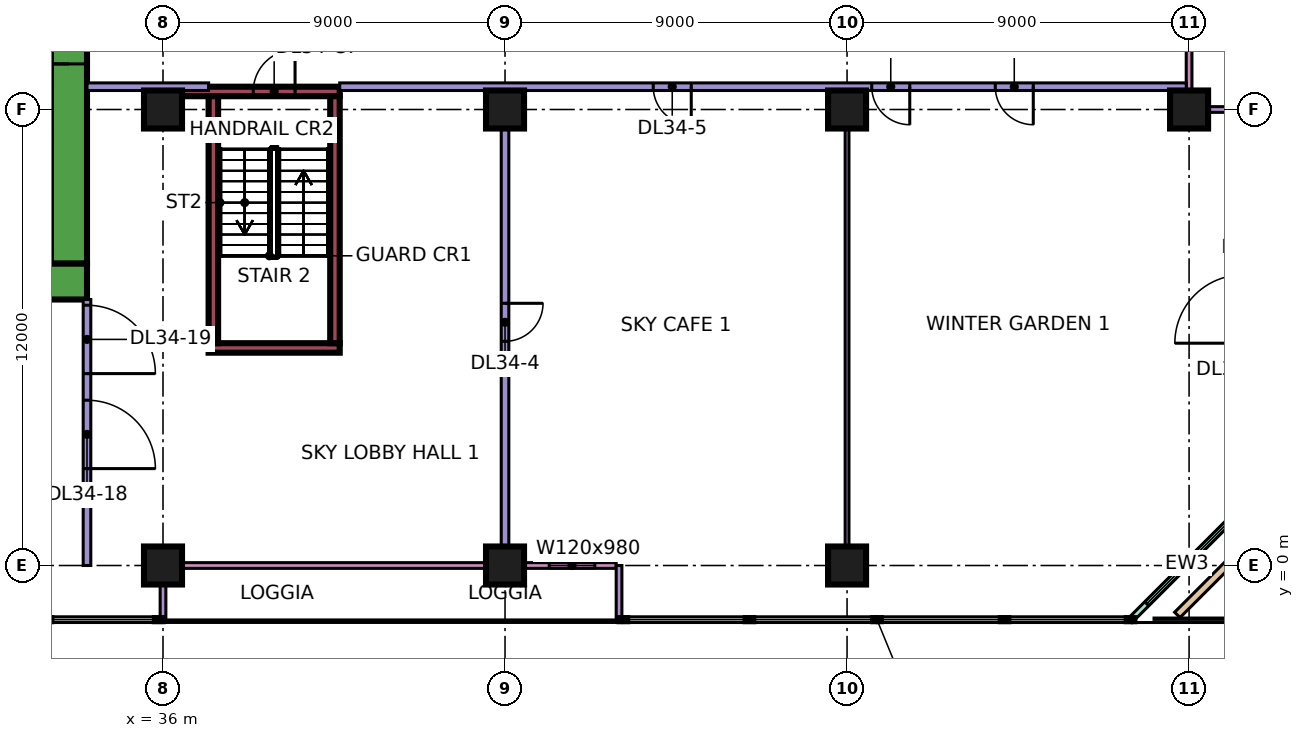
"""IFC4 building model, lengths in metres.
Left out: names, types, materials, properties, quantities, classifications, styles, units other than length and angle.
Written with IfcOpenShell. Run it as: python <this file> out.ifc"""

import sys

from ifc_helpers import new_model, si_unit, direction, frame, frame_2d, origin, origin_2d, place, context, subcontext, project, spatial, rectangle, extrude, element, fill, save


model = new_model("IFC4")
c1 = context("Model", 3, precision=1e-05, world=origin(), true_north=direction((0.0, 1.0)))
c2 = subcontext(c1, "Body", "Model", "MODEL_VIEW")
j1 = project(units=[si_unit("LENGTHUNIT", "METRE"), si_unit("PLANEANGLEUNIT", "RADIAN")], contexts=[c1])
p1 = place(None, origin())
s1 = spatial("IfcSite", under=j1, at=p1, CompositionType="ELEMENT")
p2 = place(p1, origin())
s2 = spatial("IfcBuilding", under=s1, at=p2, CompositionType="ELEMENT")
p3 = place(p2, frame((0.0, 0.0, 146.15)))
s3 = spatial("IfcBuildingStorey", under=s2, at=p3, CompositionType="ELEMENT", Elevation=146.15)
for number, where, z_axis, x_axis in (
    (1, (36.0, 0.0, 0.0), (0.0, 0.0, 1.0), (1.0, 0.0, 0.0)),
    (2, (36.0, 12.0, 0.0), (0.0, 0.0, 1.0), (1.0, 0.0, 0.0)),
    (3, (45.0, 0.0, 0.0), (0.0, 0.0, 1.0), (1.0, 0.0, 0.0)),
    (4, (45.0, 12.0, 0.0), (0.0, 0.0, 1.0), (1.0, 0.0, 0.0)),
    (5, (54.0, 0.0, 0.0), (0.0, 0.0, 1.0), (1.0, 0.0, 0.0)),
    (6, (54.0, 12.0, 0.0), (0.0, 0.0, 1.0), (1.0, 0.0, 0.0)),
    (7, (63.0, 12.0, 0.0), (0.0, 0.0, 1.0), (1.0, 0.0, 0.0)),
):
    element("IfcColumn", number, at=place(p3, frame(where, z_axis=z_axis, x_axis=x_axis)), inside=s3, PredefinedType="COLUMN", context=c2, shape_type="SweptSolid", body=[
        extrude(rectangle(XDim=1.0, YDim=1.0, at=origin_2d()), origin(), (0.0, 0.0, 1.0), 11.25),
    ])
p4 = place(p3, frame((9.0, 7.475, 0.0), z_axis=(0.0, 0.0, 1.0), x_axis=(1.0, 0.0, 0.0)))
e8 = element("IfcWall", 8, at=p4, inside=s3, PredefinedType="SHEAR", context=c2, shape_type="SweptSolid", body=[
    extrude(rectangle(XDim=25.0, YDim=0.95, at=frame_2d((12.5, 0.0))), origin(), (0.0, 0.0, 1.0), 11.25),
])
p5 = place(p3, frame((33.525, 7.95, 0.0), z_axis=(0.0, 0.0, 1.0), x_axis=(0.0, 1.0, 0.0)))
e9 = element("IfcWall", 9, at=p5, inside=s3, PredefinedType="SHEAR", context=c2, shape_type="SweptSolid", body=[
    extrude(rectangle(XDim=11.1, YDim=0.95, at=frame_2d((5.55, 0.0))), origin(), (0.0, 0.0, 1.0), 11.25),
])
p6 = place(p5, frame((5.25, 0.0, 0.0)))
e10 = element("IfcOpeningElement", 10, at=p6, cuts=e9, PredefinedType="OPENING", context=c2, shape_type="SweptSolid", body=[
    extrude(rectangle(XDim=1.8, YDim=2.4, at=frame_2d((0.9, 1.2))), frame((0.0, 0.485, 0.0), z_axis=(0.0, -1.0, 0.0), x_axis=(1.0, 0.0, 0.0)), (0.0, 0.0, 1.0), 0.97),
])
p7 = place(p3, frame((37.2, 5.725, 0.0), z_axis=(0.0, 0.0, 1.0), x_axis=(1.0, 0.0, 0.0)))
e11 = element("IfcWall", 11, at=p7, inside=s3, PredefinedType="SHEAR", context=c2, shape_type="SweptSolid", body=[
    extrude(rectangle(XDim=3.45, YDim=0.25, at=frame_2d((1.725, 0.0))), origin(), (0.0, 0.0, 1.0), 11.25),
])
p8 = place(p3, frame((36.5, 12.475, 0.0), z_axis=(0.0, 0.0, 1.0), x_axis=(1.0, 0.0, 0.0)))
e12 = element("IfcWall", 12, at=p8, inside=s3, PredefinedType="SHEAR", context=c2, shape_type="SweptSolid", body=[
    extrude(rectangle(XDim=4.15, YDim=0.25, at=frame_2d((2.075, 0.0))), origin(), (0.0, 0.0, 1.0), 11.25),
])
p9 = place(p8, frame((1.875, 0.0, 0.0)))
e13 = element("IfcOpeningElement", 13, at=p9, cuts=e12, PredefinedType="OPENING", context=c2, shape_type="SweptSolid", body=[
    extrude(rectangle(XDim=1.1, YDim=2.2, at=frame_2d((0.55, 1.1))), frame((0.0, 0.135, 0.0), z_axis=(0.0, -1.0, 0.0), x_axis=(1.0, 0.0, 0.0)), (0.0, 0.0, 1.0), 0.27),
])
for number, where, z_axis, x_axis in (
    (14, (37.325, 5.85, 0.0), (0.0, 0.0, 1.0), (0.0, 1.0, 0.0)),
    (15, (40.525, 5.85, 0.0), (0.0, 0.0, 1.0), (0.0, 1.0, 0.0)),
):
    element("IfcWall", number, at=place(p3, frame(where, z_axis=z_axis, x_axis=x_axis)), inside=s3, PredefinedType="SHEAR", context=c2, shape_type="SweptSolid", body=[
        extrude(rectangle(XDim=6.5, YDim=0.25, at=frame_2d((3.25, 0.0))), origin(), (0.0, 0.0, 1.0), 11.25),
    ])
p10 = place(p3, frame((36.075, 0.0, 0.0), z_axis=(0.0, 0.0, 1.0), x_axis=(1.0, 0.0, 0.0)))
e16 = element("IfcWall", 16, at=p10, inside=s3, PredefinedType="SOLIDWALL", context=c2, shape_type="SweptSolid", body=[
    extrude(rectangle(XDim=11.85, YDim=0.15, at=frame_2d((5.925, 0.0))), origin(), (0.0, 0.0, 1.0), 10.85),
])
p11 = place(p10, frame((10.087, 0.0, 0.45)))
e17 = element("IfcOpeningElement", 17, at=p11, cuts=e16, PredefinedType="OPENING", context=c2, shape_type="SweptSolid", body=[
    extrude(rectangle(XDim=1.2, YDim=9.8, at=frame_2d((0.6, 4.9))), frame((0.0, 0.085, 0.0), z_axis=(0.0, -1.0, 0.0), x_axis=(1.0, 0.0, 0.0)), (0.0, 0.0, 1.0), 0.17),
])
for number, where, z_axis, x_axis in (
    (18, (36.0, -1.5, 0.0), (0.0, 0.0, 1.0), (0.0, 1.0, 0.0)),
    (19, (48.0, -1.5, 0.0), (0.0, 0.0, 1.0), (0.0, 1.0, 0.0)),
):
    element("IfcWall", number, at=place(p3, frame(where, z_axis=z_axis, x_axis=x_axis)), inside=s3, PredefinedType="SOLIDWALL", context=c2, shape_type="SweptSolid", body=[
        extrude(rectangle(XDim=1.5, YDim=0.15, at=frame_2d((0.75, 0.0))), origin(), (0.0, 0.0, 1.0), 10.85),
    ])
p12 = place(p3, frame((61.447, -1.447, 0.0), z_axis=(0.0, 0.0, 1.0), x_axis=(0.707106781187, 0.707106781187, 0.0)))
e20 = element("IfcWall", 20, at=p12, inside=s3, PredefinedType="SOLIDWALL", context=c2, shape_type="SweptSolid", body=[
    extrude(rectangle(XDim=4.243, YDim=0.15, at=frame_2d((2.121, 0.0))), origin(), (0.0, 0.0, 1.0), 10.85),
])
p13 = place(p12, frame((0.621, 0.0, 0.45)))
e21 = element("IfcOpeningElement", 21, at=p13, cuts=e20, PredefinedType="OPENING", context=c2, shape_type="SweptSolid", body=[
    extrude(rectangle(XDim=3.0, YDim=9.8, at=frame_2d((1.5, 4.9))), frame((0.0, 0.085, 0.0), z_axis=(0.0, -1.0, 0.0), x_axis=(1.0, 0.0, 0.0)), (0.0, 0.0, 1.0), 0.17),
])
p14 = place(p3, frame((63.0, 12.075, 0.0), z_axis=(0.0, 0.0, 1.0), x_axis=(0.0, 1.0, 0.0)))
e22 = element("IfcWall", 22, at=p14, inside=s3, PredefinedType="SOLIDWALL", context=c2, shape_type="SweptSolid", body=[
    extrude(rectangle(XDim=10.35, YDim=0.15, at=frame_2d((5.175, 0.0))), origin(), (0.0, 0.0, 1.0), 10.85),
])
p15 = place(p14, frame((5.438, 0.0, 0.45)))
e23 = element("IfcOpeningElement", 23, at=p15, cuts=e22, PredefinedType="OPENING", context=c2, shape_type="SweptSolid", body=[
    extrude(rectangle(XDim=3.0, YDim=9.8, at=frame_2d((1.5, 4.9))), frame((0.0, 0.085, 0.0), z_axis=(0.0, -1.0, 0.0), x_axis=(1.0, 0.0, 0.0)), (0.0, 0.0, 1.0), 0.17),
])
p16 = place(p3, frame((64.5, 12.0, 0.0), z_axis=(0.0, 0.0, 1.0), x_axis=(-1.0, 0.0, 0.0)))
e24 = element("IfcWall", 24, at=p16, inside=s3, PredefinedType="SOLIDWALL", context=c2, shape_type="SweptSolid", body=[
    extrude(rectangle(XDim=1.5, YDim=0.15, at=frame_2d((0.75, 0.0))), origin(), (0.0, 0.0, 1.0), 10.85),
])
p17 = place(p3, frame((65.2, 1.21, 0.0), z_axis=(0.0, 0.0, 1.0), x_axis=(-0.707106781187, -0.707106781187, 0.0)))
e25 = element("IfcWall", 25, at=p17, inside=s3, PredefinedType="PARAPET", context=c2, shape_type="SweptSolid", body=[
    extrude(rectangle(XDim=3.55, YDim=0.2, at=frame_2d((1.775, 0.0))), origin(), (0.0, 0.0, 1.0), 0.5),
])
p18 = place(p3, frame((34.0, 0.0, 0.0), z_axis=(0.0, 0.0, 1.0), x_axis=(0.0, 1.0, 0.0)))
e26 = element("IfcWall", 26, at=p18, inside=s3, PredefinedType="PARTITIONING", context=c2, shape_type="SweptSolid", body=[
    extrude(rectangle(XDim=7.0, YDim=0.2, at=frame_2d((3.5, 0.0))), origin(), (0.0, 0.0, 1.0), 10.85),
])
p19 = place(p18, frame((2.55, 0.0, 0.0)))
e27 = element("IfcOpeningElement", 27, at=p19, cuts=e26, PredefinedType="OPENING", context=c2, shape_type="SweptSolid", body=[
    extrude(rectangle(XDim=1.8, YDim=2.1, at=frame_2d((0.9, 1.05))), frame((0.0, 0.11, 0.0), z_axis=(0.0, -1.0, 0.0), x_axis=(1.0, 0.0, 0.0)), (0.0, 0.0, 1.0), 0.22),
])
p20 = place(p18, frame((5.05, 0.0, 0.0)))
e28 = element("IfcOpeningElement", 28, at=p20, cuts=e26, PredefinedType="OPENING", context=c2, shape_type="SweptSolid", body=[
    extrude(rectangle(XDim=1.8, YDim=2.1, at=frame_2d((0.9, 1.05))), frame((0.0, 0.11, 0.0), z_axis=(0.0, -1.0, 0.0), x_axis=(1.0, 0.0, 0.0)), (0.0, 0.0, 1.0), 0.22),
])
p21 = place(p3, frame((34.0, 12.6, 0.0), z_axis=(0.0, 0.0, 1.0), x_axis=(1.0, 0.0, 0.0)))
e29 = element("IfcWall", 29, at=p21, inside=s3, PredefinedType="PARTITIONING", context=c2, shape_type="SweptSolid", body=[
    extrude(rectangle(XDim=3.2, YDim=0.2, at=frame_2d((1.6, 0.0))), origin(), (0.0, 0.0, 1.0), 10.85),
])
p22 = place(p3, frame((40.65, 12.6, 0.0), z_axis=(0.0, 0.0, 1.0), x_axis=(1.0, 0.0, 0.0)))
e30 = element("IfcWall", 30, at=p22, inside=s3, PredefinedType="PARTITIONING", context=c2, shape_type="SweptSolid", body=[
    extrude(rectangle(XDim=22.276, YDim=0.2, at=frame_2d((11.138, 0.0))), origin(), (0.0, 0.0, 1.0), 10.85),
])
p23 = place(p22, frame((8.25, 0.0, 0.0)))
e31 = element("IfcOpeningElement", 31, at=p23, cuts=e30, PredefinedType="OPENING", context=c2, shape_type="SweptSolid", body=[
    extrude(rectangle(XDim=1.0, YDim=2.1, at=frame_2d((0.5, 1.05))), frame((0.0, 0.11, 0.0), z_axis=(0.0, -1.0, 0.0), x_axis=(1.0, 0.0, 0.0)), (0.0, 0.0, 1.0), 0.22),
])
p24 = place(p22, frame((17.25, 0.0, 0.0)))
e32 = element("IfcOpeningElement", 32, at=p24, cuts=e30, PredefinedType="OPENING", context=c2, shape_type="SweptSolid", body=[
    extrude(rectangle(XDim=1.0, YDim=2.1, at=frame_2d((0.5, 1.05))), frame((0.0, 0.11, 0.0), z_axis=(0.0, -1.0, 0.0), x_axis=(1.0, 0.0, 0.0)), (0.0, 0.0, 1.0), 0.22),
])
p25 = place(p22, frame((14.0, 0.0, 0.0)))
e33 = element("IfcOpeningElement", 33, at=p25, cuts=e30, PredefinedType="OPENING", context=c2, shape_type="SweptSolid", body=[
    extrude(rectangle(XDim=1.0, YDim=2.1, at=frame_2d((0.5, 1.05))), frame((0.0, 0.11, 0.0), z_axis=(0.0, -1.0, 0.0), x_axis=(1.0, 0.0, 0.0)), (0.0, 0.0, 1.0), 0.22),
])
p26 = place(p3, frame((45.0, 0.074, 0.0), z_axis=(0.0, 0.0, 1.0), x_axis=(0.0, 1.0, 0.0)))
e34 = element("IfcWall", 34, at=p26, inside=s3, PredefinedType="PARTITIONING", context=c2, shape_type="SweptSolid", body=[
    extrude(rectangle(XDim=12.426, YDim=0.2, at=frame_2d((6.213, 0.0))), origin(), (0.0, 0.0, 1.0), 10.85),
])
p27 = place(p26, frame((5.826, 0.0, 0.0)))
e35 = element("IfcOpeningElement", 35, at=p27, cuts=e34, PredefinedType="OPENING", context=c2, shape_type="SweptSolid", body=[
    extrude(rectangle(XDim=1.0, YDim=2.1, at=frame_2d((0.5, 1.05))), frame((0.0, 0.11, 0.0), z_axis=(0.0, -1.0, 0.0), x_axis=(1.0, 0.0, 0.0)), (0.0, 0.0, 1.0), 0.22),
])
p28 = place(p3, frame((54.0, 0.0, 0.0), z_axis=(0.0, 0.0, 1.0), x_axis=(0.0, 1.0, 0.0)))
e36 = element("IfcWall", 36, at=p28, inside=s3, PredefinedType="PARTITIONING", context=c2, shape_type="SweptSolid", body=[
    extrude(rectangle(XDim=12.5, YDim=0.1, at=frame_2d((6.25, 0.0))), origin(), (0.0, 0.0, 1.0), 10.85),
])
p29 = place(p11, origin())
e37 = element("IfcWindow", 37, at=p29, inside=s3, PartitioningType="SINGLE_PANEL", PredefinedType="WINDOW", context=c2, shape_type="SweptSolid", body=[
    extrude(rectangle(XDim=1.2, YDim=9.8, at=frame_2d((0.6, 4.9))), frame((0.0, 0.03, 0.0), z_axis=(0.0, -1.0, 0.0), x_axis=(1.0, 0.0, 0.0)), (0.0, 0.0, 1.0), 0.06),
])
fill(e17, e37)
p30 = place(p13, origin())
e38 = element("IfcWindow", 38, at=p30, inside=s3, PartitioningType="SINGLE_PANEL", PredefinedType="WINDOW", context=c2, shape_type="SweptSolid", body=[
    extrude(rectangle(XDim=3.0, YDim=9.8, at=frame_2d((1.5, 4.9))), frame((0.0, 0.03, 0.0), z_axis=(0.0, -1.0, 0.0), x_axis=(1.0, 0.0, 0.0)), (0.0, 0.0, 1.0), 0.06),
])
fill(e21, e38)
p31 = place(p6, origin())
e39 = element("IfcDoor", 39, at=p31, inside=s3, OperationType="DOUBLE_DOOR_SINGLE_SWING", PredefinedType="DOOR", context=c2, shape_type="SweptSolid", body=[
    extrude(rectangle(XDim=1.8, YDim=2.4, at=frame_2d((0.9, 1.2))), frame((0.0, 0.025, 0.0), z_axis=(0.0, -1.0, 0.0), x_axis=(1.0, 0.0, 0.0)), (0.0, 0.0, 1.0), 0.05),
])
fill(e10, e39)
p32 = place(p9, frame((1.1, 0.0, 0.0), z_axis=(0.0, 0.0, 1.0), x_axis=(-1.0, 0.0, 0.0)))
e40 = element("IfcDoor", 40, at=p32, inside=s3, OperationType="SINGLE_SWING_RIGHT", PredefinedType="DOOR", context=c2, shape_type="SweptSolid", body=[
    extrude(rectangle(XDim=1.1, YDim=2.2, at=frame_2d((0.55, 1.1))), frame((0.0, 0.025, 0.0), z_axis=(0.0, -1.0, 0.0), x_axis=(1.0, 0.0, 0.0)), (0.0, 0.0, 1.0), 0.05),
])
fill(e13, e40)
p33 = place(p27, origin())
e41 = element("IfcDoor", 41, at=p33, inside=s3, OperationType="SINGLE_SWING_RIGHT", PredefinedType="DOOR", context=c2, shape_type="SweptSolid", body=[
    extrude(rectangle(XDim=1.0, YDim=2.1, at=frame_2d((0.5, 1.05))), frame((0.0, 0.025, 0.0), z_axis=(0.0, -1.0, 0.0), x_axis=(1.0, 0.0, 0.0)), (0.0, 0.0, 1.0), 0.05),
])
fill(e35, e41)
p34 = place(p23, origin())
e42 = element("IfcDoor", 42, at=p34, inside=s3, OperationType="SINGLE_SWING_RIGHT", PredefinedType="DOOR", context=c2, shape_type="SweptSolid", body=[
    extrude(rectangle(XDim=1.0, YDim=2.1, at=frame_2d((0.5, 1.05))), frame((0.0, 0.025, 0.0), z_axis=(0.0, -1.0, 0.0), x_axis=(1.0, 0.0, 0.0)), (0.0, 0.0, 1.0), 0.05),
])
fill(e31, e42)
p35 = place(p24, origin())
e43 = element("IfcDoor", 43, at=p35, inside=s3, OperationType="SINGLE_SWING_RIGHT", PredefinedType="DOOR", context=c2, shape_type="SweptSolid", body=[
    extrude(rectangle(XDim=1.0, YDim=2.1, at=frame_2d((0.5, 1.05))), frame((0.0, 0.025, 0.0), z_axis=(0.0, -1.0, 0.0), x_axis=(1.0, 0.0, 0.0)), (0.0, 0.0, 1.0), 0.05),
])
fill(e32, e43)
p36 = place(p25, origin())
e44 = element("IfcDoor", 44, at=p36, inside=s3, OperationType="SINGLE_SWING_RIGHT", PredefinedType="DOOR", context=c2, shape_type="SweptSolid", body=[
    extrude(rectangle(XDim=1.0, YDim=2.1, at=frame_2d((0.5, 1.05))), frame((0.0, 0.025, 0.0), z_axis=(0.0, -1.0, 0.0), x_axis=(1.0, 0.0, 0.0)), (0.0, 0.0, 1.0), 0.05),
])
fill(e33, e44)
p37 = place(p19, frame((1.8, 0.0, 0.0), z_axis=(0.0, 0.0, 1.0), x_axis=(-1.0, 0.0, 0.0)))
e45 = element("IfcDoor", 45, at=p37, inside=s3, OperationType="DOUBLE_DOOR_SINGLE_SWING", PredefinedType="DOOR", context=c2, shape_type="SweptSolid", body=[
    extrude(rectangle(XDim=1.8, YDim=2.1, at=frame_2d((0.9, 1.05))), frame((0.0, 0.025, 0.0), z_axis=(0.0, -1.0, 0.0), x_axis=(1.0, 0.0, 0.0)), (0.0, 0.0, 1.0), 0.05),
])
fill(e27, e45)
p38 = place(p20, frame((1.8, 0.0, 0.0), z_axis=(0.0, 0.0, 1.0), x_axis=(-1.0, 0.0, 0.0)))
e46 = element("IfcDoor", 46, at=p38, inside=s3, OperationType="DOUBLE_DOOR_SINGLE_SWING", PredefinedType="DOOR", context=c2, shape_type="SweptSolid", body=[
    extrude(rectangle(XDim=1.8, YDim=2.1, at=frame_2d((0.9, 1.05))), frame((0.0, 0.025, 0.0), z_axis=(0.0, -1.0, 0.0), x_axis=(1.0, 0.0, 0.0)), (0.0, 0.0, 1.0), 0.05),
])
fill(e28, e46)
save(model, sys.argv[1])
